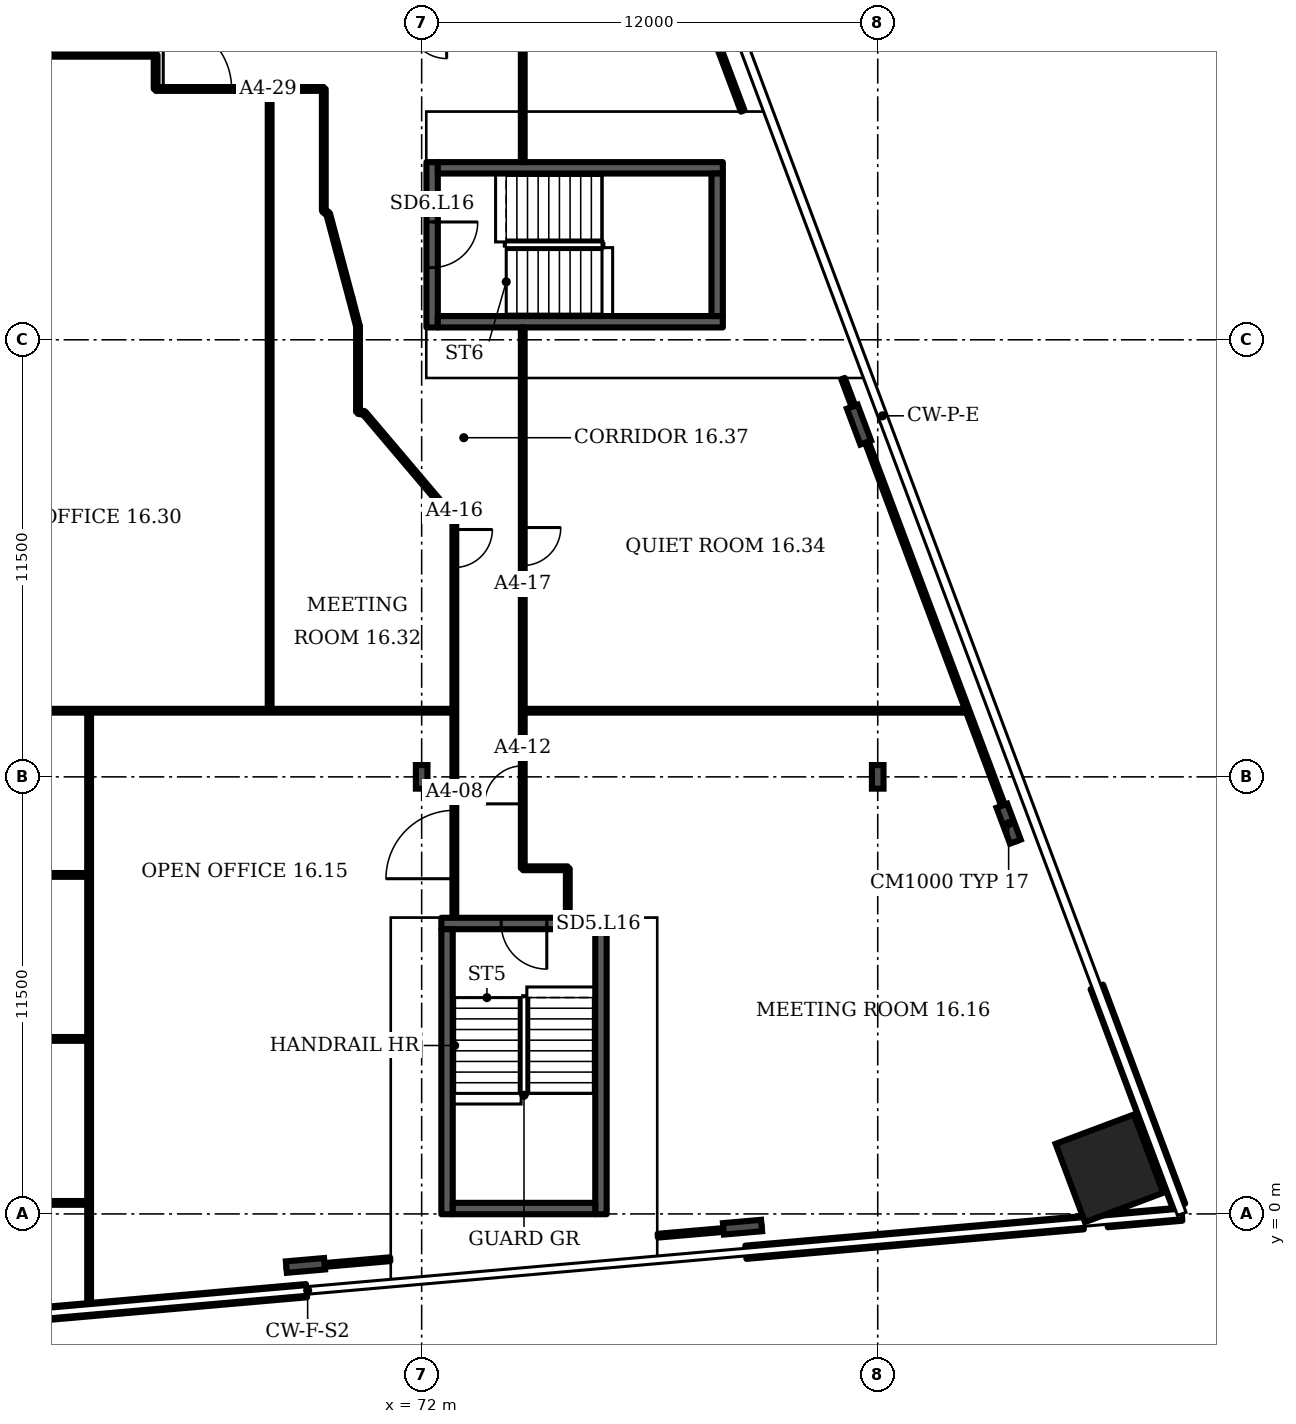
"""IFC4 building model, lengths in metres.
Left out: names, types, materials, properties, quantities, classifications, styles, units other than length and angle.
Written with IfcOpenShell. Run it as: python <this file> out.ifc"""

import sys

from ifc_helpers import new_model, si_unit, direction, frame, frame_2d, origin, origin_2d, place, context, subcontext, project, spatial, rectangle, i_section, extrude, element, fill, save


model = new_model("IFC4")
c1 = context("Model", 3, precision=1e-05, world=origin(), true_north=direction((0.0, 1.0)))
c2 = subcontext(c1, "Body", "Model", "MODEL_VIEW")
j1 = project(units=[si_unit("LENGTHUNIT", "METRE"), si_unit("PLANEANGLEUNIT", "RADIAN")], contexts=[c1])
p1 = place(None, origin())
s1 = spatial("IfcSite", under=j1, at=p1, CompositionType="ELEMENT")
p2 = place(p1, origin())
s2 = spatial("IfcBuilding", under=s1, at=p2, CompositionType="ELEMENT")
p3 = place(p2, frame((0.0, 0.0, 77.5)))
s3 = spatial("IfcBuildingStorey", under=s2, at=p3, CompositionType="ELEMENT", Elevation=77.5)
p4 = place(p3, frame((90.096, 1.2, 0.0), z_axis=(0.0, 0.0, 1.0), x_axis=(-0.351123, 0.936328, 0.0)))
e1 = element("IfcColumn", 1, at=p4, inside=s3, PredefinedType="COLUMN", context=c2, shape_type="SweptSolid", body=[
    extrude(rectangle(XDim=2.2, YDim=2.2, at=origin_2d()), origin(), (0.0, 0.0, 1.0), 3.6),
])
for number, where, z_axis, x_axis in (
    (2, (68.942, -1.355, 0.0), (0.0, 0.0, 1.0), (0.087, -0.996, 0.0)),
    (3, (80.442, -0.349, 0.0), (0.0, 0.0, 1.0), (0.087, -0.996, 0.0)),
    (4, (87.445, 10.268, 0.0), (0.0, 0.0, 1.0), (0.936, 0.351, 0.0)),
    (5, (83.507, 20.768, 0.0), (0.0, 0.0, 1.0), (0.936, 0.351, 0.0)),
):
    element("IfcColumn", number, at=place(p3, frame(where, z_axis=z_axis, x_axis=x_axis)), inside=s3, PredefinedType="COLUMN", context=c2, shape_type="SweptSolid", body=[
        extrude(i_section(OverallWidth=0.302, OverallDepth=1.008, WebThickness=0.021, FlangeThickness=0.04, FilletRadius=0.03, at=origin_2d()), origin(), (0.0, 0.0, 1.0), 3.6),
    ])
for number, where, z_axis, x_axis in (
    (6, (72.0, 11.5, 0.0), (0.0, 0.0, 1.0), (1.0, 0.0, 0.0)),
    (7, (84.0, 11.5, 0.0), (0.0, 0.0, 1.0), (1.0, 0.0, 0.0)),
):
    element("IfcColumn", number, at=place(p3, frame(where, z_axis=z_axis, x_axis=x_axis)), inside=s3, PredefinedType="COLUMN", context=c2, shape_type="SweptSolid", body=[
        extrude(i_section(OverallWidth=0.305, OverallDepth=0.62, WebThickness=0.021, FlangeThickness=0.04, FilletRadius=0.027, at=origin_2d()), origin(), (0.0, 0.0, 1.0), 3.6),
    ])
p5 = place(p3, frame((46.045, -4.026, 0.0), z_axis=(0.0, 0.0, 1.0), x_axis=(0.99619, 0.087163, 0.0)))
e8 = element("IfcWall", 8, at=p5, inside=s3, PredefinedType="SOLIDWALL", context=c2, shape_type="SweptSolid", body=[
    extrude(rectangle(XDim=23.013, YDim=0.35, at=frame_2d((11.506, 0.0))), origin(), (0.0, 0.0, 1.0), 1.0),
])
p6 = place(p3, frame((80.53, -1.009, 0.0), z_axis=(0.0, 0.0, 1.0), x_axis=(0.996198, 0.087169, 0.0)))
e9 = element("IfcWall", 9, at=p6, inside=s3, PredefinedType="SOLIDWALL", context=c2, shape_type="SweptSolid", body=[
    extrude(rectangle(XDim=8.912, YDim=0.35, at=frame_2d((4.456, 0.0))), origin(), (0.0, 0.0, 1.0), 1.0),
])
p7 = place(p3, frame((90.039, -0.177, 0.0), z_axis=(0.0, 0.0, 1.0), x_axis=(0.996193, 0.08717, 0.0)))
e10 = element("IfcWall", 10, at=p7, inside=s3, PredefinedType="SOLIDWALL", context=c2, shape_type="SweptSolid", body=[
    extrude(rectangle(XDim=1.969, YDim=0.35, at=frame_2d((0.984, 0.0))), origin(), (0.0, 0.0, 1.0), 1.0),
])
p8 = place(p3, frame((91.926, 0.211, 0.0), z_axis=(0.0, 0.0, 1.0), x_axis=(-0.351118, 0.936328, 0.0)))
e11 = element("IfcWall", 11, at=p8, inside=s3, PredefinedType="SOLIDWALL", context=c2, shape_type="SweptSolid", body=[
    extrude(rectangle(XDim=6.154, YDim=0.35, at=frame_2d((3.077, 0.0))), origin(), (0.0, 0.0, 1.0), 1.0),
])
p9 = place(p3, frame((72.518, 7.642, 0.0), z_axis=(0.0, 0.0, 1.0), x_axis=(1.0, 0.0, 0.0)))
e12 = element("IfcWall", 12, at=p9, inside=s3, PredefinedType="SHEAR", context=c2, shape_type="SweptSolid", body=[
    extrude(rectangle(XDim=4.35, YDim=0.3, at=frame_2d((2.175, 0.0))), origin(), (0.0, 0.0, 1.0), 3.2),
])
p10 = place(p9, frame((1.575, 0.0, 0.0)))
e13 = element("IfcOpeningElement", 13, at=p10, cuts=e12, PredefinedType="OPENING", context=c2, shape_type="SweptSolid", body=[
    extrude(rectangle(XDim=1.2, YDim=2.1, at=frame_2d((0.6, 1.05))), frame((0.0, 0.16, 0.0), z_axis=(0.0, -1.0, 0.0), x_axis=(1.0, 0.0, 0.0)), (0.0, 0.0, 1.0), 0.32),
])
p11 = place(p3, frame((72.275, 23.325, 0.0), z_axis=(0.0, 0.0, 1.0), x_axis=(0.0, 1.0, 0.0)))
e14 = element("IfcWall", 14, at=p11, inside=s3, PredefinedType="SHEAR", context=c2, shape_type="SweptSolid", body=[
    extrude(rectangle(XDim=4.35, YDim=0.3, at=frame_2d((2.175, 0.0))), origin(), (0.0, 0.0, 1.0), 3.2),
])
p12 = place(p11, frame((1.575, 0.0, 0.0)))
e15 = element("IfcOpeningElement", 15, at=p12, cuts=e14, PredefinedType="OPENING", context=c2, shape_type="SweptSolid", body=[
    extrude(rectangle(XDim=1.2, YDim=2.1, at=frame_2d((0.6, 1.05))), frame((0.0, 0.16, 0.0), z_axis=(0.0, -1.0, 0.0), x_axis=(1.0, 0.0, 0.0)), (0.0, 0.0, 1.0), 0.32),
])
for number, where, z_axis, x_axis in (
    (16, (45.3, 0.29, 0.0), (0.0, 0.0, 1.0), (1.0, 0.0, 0.0)),
    (17, (45.3, 4.605, 0.0), (0.0, 0.0, 1.0), (1.0, 0.0, 0.0)),
    (18, (45.3, 8.92, 0.0), (0.0, 0.0, 1.0), (1.0, 0.0, 0.0)),
):
    element("IfcWall", number, at=place(p3, frame(where, z_axis=z_axis, x_axis=x_axis)), inside=s3, PredefinedType="PARTITIONING", context=c2, shape_type="SweptSolid", body=[
        extrude(rectangle(XDim=17.95, YDim=0.1, at=frame_2d((8.975, 0.0))), origin(), (0.0, 0.0, 1.0), 3.2),
    ])
p13 = place(p3, frame((45.3, 13.24, 0.0), z_axis=(0.0, 0.0, 1.0), x_axis=(1.0, 0.0, 0.0)))
e19 = element("IfcWall", 19, at=p13, inside=s3, PredefinedType="PARTITIONING", context=c2, shape_type="SweptSolid", body=[
    extrude(rectangle(XDim=27.56, YDim=0.1, at=frame_2d((13.78, 0.0))), origin(), (0.0, 0.0, 1.0), 3.2),
])
p14 = place(p3, frame((45.3, 30.5, 0.0), z_axis=(0.0, 0.0, 1.0), x_axis=(1.0, 0.0, 0.0)))
e20 = element("IfcWall", 20, at=p14, inside=s3, PredefinedType="PARTITIONING", context=c2, shape_type="SweptSolid", body=[
    extrude(rectangle(XDim=19.7, YDim=0.1, at=frame_2d((9.85, 0.0))), origin(), (0.0, 0.0, 1.0), 3.2),
])
p15 = place(p3, frame((63.25, -2.495, 0.0), z_axis=(0.0, 0.0, 1.0), x_axis=(0.0, 1.0, 0.0)))
e21 = element("IfcWall", 21, at=p15, inside=s3, PredefinedType="PARTITIONING", context=c2, shape_type="SweptSolid", body=[
    extrude(rectangle(XDim=15.735, YDim=0.1, at=frame_2d((7.868, 0.0))), origin(), (0.0, 0.0, 1.0), 2.58),
])
p16 = place(p3, frame((65.0, 29.6, 0.0), z_axis=(0.0, 0.0, 1.0), x_axis=(0.0, 1.0, 0.0)))
e22 = element("IfcWall", 22, at=p16, inside=s3, PredefinedType="PARTITIONING", context=c2, shape_type="SweptSolid", body=[
    extrude(rectangle(XDim=0.9, YDim=0.1, at=frame_2d((0.45, 0.0))), origin(), (0.0, 0.0, 1.0), 3.2),
])
p17 = place(p3, frame((65.0, 29.6, 0.0), z_axis=(0.0, 0.0, 1.0), x_axis=(1.0, 0.0, 0.0)))
e23 = element("IfcWall", 23, at=p17, inside=s3, PredefinedType="PARTITIONING", context=c2, shape_type="SweptSolid", body=[
    extrude(rectangle(XDim=4.425, YDim=0.1, at=frame_2d((2.212, 0.0))), origin(), (0.0, 0.0, 1.0), 3.2),
])
p18 = place(p17, frame((0.2, 0.0, 0.0)))
e24 = element("IfcOpeningElement", 24, at=p18, cuts=e23, PredefinedType="OPENING", context=c2, shape_type="SweptSolid", body=[
    extrude(rectangle(XDim=1.8, YDim=2.1, at=frame_2d((0.9, 1.05))), frame((0.0, 0.06, 0.0), z_axis=(0.0, -1.0, 0.0), x_axis=(1.0, 0.0, 0.0)), (0.0, 0.0, 1.0), 0.12),
])
p19 = place(p3, frame((68.0, 13.24, 0.0), z_axis=(0.0, 0.0, 1.0), x_axis=(0.0, 1.0, 0.0)))
e25 = element("IfcWall", 25, at=p19, inside=s3, PredefinedType="PARTITIONING", context=c2, shape_type="SweptSolid", body=[
    extrude(rectangle(XDim=16.36, YDim=0.1, at=frame_2d((8.18, 0.0))), origin(), (0.0, 0.0, 1.0), 3.2),
])
p20 = place(p3, frame((68.445, -1.43, 0.0), z_axis=(0.0, 0.0, 1.0), x_axis=(0.996195, 0.087118, 0.0)))
e26 = element("IfcWall", 26, at=p20, inside=s3, PredefinedType="PARTITIONING", context=c2, shape_type="SweptSolid", body=[
    extrude(rectangle(XDim=2.738, YDim=0.1, at=frame_2d((1.369, 0.0))), origin(), (0.0, 0.0, 1.0), 2.58),
])
p21 = place(p3, frame((69.425, 26.4, 0.0), z_axis=(0.0, 0.0, 1.0), x_axis=(0.0, 1.0, 0.0)))
e27 = element("IfcWall", 27, at=p21, inside=s3, PredefinedType="PARTITIONING", context=c2, shape_type="SweptSolid", body=[
    extrude(rectangle(XDim=3.2, YDim=0.1, at=frame_2d((1.6, 0.0))), origin(), (0.0, 0.0, 1.0), 3.2),
])
p22 = place(p3, frame((69.54, 26.31, 0.0), z_axis=(0.0, 0.0, 1.0), x_axis=(-0.787997, 0.615675, 0.0)))
e28 = element("IfcWall", 28, at=p22, inside=s3, PredefinedType="PARTITIONING", context=c2, shape_type="SweptSolid", body=[
    extrude(rectangle(XDim=0.146, YDim=0.1, at=frame_2d((0.073, 0.0))), origin(), (0.0, 0.0, 1.0), 3.2),
])
p23 = place(p3, frame((70.13, 24.095, 0.0), z_axis=(0.0, 0.0, 1.0), x_axis=(-0.257318, 0.966327, 0.0)))
e29 = element("IfcWall", 29, at=p23, inside=s3, PredefinedType="PARTITIONING", context=c2, shape_type="SweptSolid", body=[
    extrude(rectangle(XDim=2.292, YDim=0.1, at=frame_2d((1.146, 0.0))), origin(), (0.0, 0.0, 1.0), 3.2),
])
p24 = place(p3, frame((70.325, 21.1, 0.0), z_axis=(0.0, 0.0, 1.0), x_axis=(0.0, 1.0, 0.0)))
e30 = element("IfcWall", 30, at=p24, inside=s3, PredefinedType="PARTITIONING", context=c2, shape_type="SweptSolid", body=[
    extrude(rectangle(XDim=2.255, YDim=0.1, at=frame_2d((1.127, 0.0))), origin(), (0.0, 0.0, 1.0), 3.2),
])
p25 = place(p3, frame((70.325, 23.355, 0.0), z_axis=(0.0, 0.0, 1.0), x_axis=(-0.254901, 0.966965, 0.0)))
e31 = element("IfcWall", 31, at=p25, inside=s3, PredefinedType="PARTITIONING", context=c2, shape_type="SweptSolid", body=[
    extrude(rectangle(XDim=0.765, YDim=0.1, at=frame_2d((0.383, 0.0))), origin(), (0.0, 0.0, 1.0), 3.2),
])
p26 = place(p3, frame((70.485, 21.075, 0.0), z_axis=(0.0, 0.0, 1.0), x_axis=(-0.987098, 0.160112, 0.0)))
e32 = element("IfcWall", 32, at=p26, inside=s3, PredefinedType="PARTITIONING", context=c2, shape_type="SweptSolid", body=[
    extrude(rectangle(XDim=0.157, YDim=0.1, at=frame_2d((0.079, 0.0))), origin(), (0.0, 0.0, 1.0), 3.2),
])
p27 = place(p3, frame((72.86, 7.812, 0.0), z_axis=(0.0, 0.0, 1.0), x_axis=(0.0, 1.0, 0.0)))
e33 = element("IfcWall", 33, at=p27, inside=s3, PredefinedType="PARTITIONING", context=c2, shape_type="SweptSolid", body=[
    extrude(rectangle(XDim=10.463, YDim=0.1, at=frame_2d((5.231, 0.0))), origin(), (0.0, 0.0, 1.0), 3.2),
])
p28 = place(p27, frame((1.008, 0.0, 0.0)))
e34 = element("IfcOpeningElement", 34, at=p28, cuts=e33, PredefinedType="OPENING", context=c2, shape_type="SweptSolid", body=[
    extrude(rectangle(XDim=1.8, YDim=2.1, at=frame_2d((0.9, 1.05))), frame((0.0, 0.06, 0.0), z_axis=(0.0, -1.0, 0.0), x_axis=(1.0, 0.0, 0.0)), (0.0, 0.0, 1.0), 0.12),
])
p29 = place(p27, frame((9.197, 0.0, 0.0)))
e35 = element("IfcOpeningElement", 35, at=p29, cuts=e33, PredefinedType="OPENING", context=c2, shape_type="SweptSolid", body=[
    extrude(rectangle(XDim=1.0, YDim=2.1, at=frame_2d((0.5, 1.05))), frame((0.0, 0.06, 0.0), z_axis=(0.0, -1.0, 0.0), x_axis=(1.0, 0.0, 0.0)), (0.0, 0.0, 1.0), 0.12),
])
p30 = place(p3, frame((72.86, 18.275, 0.0), z_axis=(0.0, 0.0, 1.0), x_axis=(-0.646848, 0.762613, 0.0)))
e36 = element("IfcWall", 36, at=p30, inside=s3, PredefinedType="PARTITIONING", context=c2, shape_type="SweptSolid", body=[
    extrude(rectangle(XDim=3.672, YDim=0.1, at=frame_2d((1.836, 0.0))), origin(), (0.0, 0.0, 1.0), 3.2),
])
p31 = place(p3, frame((74.66, 9.095, 0.0), z_axis=(0.0, 0.0, 1.0), x_axis=(0.0, 1.0, 0.0)))
e37 = element("IfcWall", 37, at=p31, inside=s3, PredefinedType="PARTITIONING", context=c2, shape_type="SweptSolid", body=[
    extrude(rectangle(XDim=14.23, YDim=0.1, at=frame_2d((7.115, 0.0))), origin(), (0.0, 0.0, 1.0), 3.2),
])
p32 = place(p31, frame((1.695, 0.0, 0.0)))
e38 = element("IfcOpeningElement", 38, at=p32, cuts=e37, PredefinedType="OPENING", context=c2, shape_type="SweptSolid", body=[
    extrude(rectangle(XDim=1.0, YDim=2.1, at=frame_2d((0.5, 1.05))), frame((0.0, 0.06, 0.0), z_axis=(0.0, -1.0, 0.0), x_axis=(1.0, 0.0, 0.0)), (0.0, 0.0, 1.0), 0.12),
])
p33 = place(p31, frame((7.965, 0.0, 0.0)))
e39 = element("IfcOpeningElement", 39, at=p33, cuts=e37, PredefinedType="OPENING", context=c2, shape_type="SweptSolid", body=[
    extrude(rectangle(XDim=1.0, YDim=2.1, at=frame_2d((0.5, 1.05))), frame((0.0, 0.06, 0.0), z_axis=(0.0, -1.0, 0.0), x_axis=(1.0, 0.0, 0.0)), (0.0, 0.0, 1.0), 0.12),
])
p34 = place(p3, frame((74.66, 27.675, 0.0), z_axis=(0.0, 0.0, 1.0), x_axis=(0.0, 1.0, 0.0)))
e40 = element("IfcWall", 40, at=p34, inside=s3, PredefinedType="PARTITIONING", context=c2, shape_type="SweptSolid", body=[
    extrude(rectangle(XDim=3.325, YDim=0.1, at=frame_2d((1.663, 0.0))), origin(), (0.0, 0.0, 1.0), 3.2),
])
p35 = place(p3, frame((74.665, 9.095, 0.0), z_axis=(0.0, 0.0, 1.0), x_axis=(1.0, 0.0, 0.0)))
e41 = element("IfcWall", 41, at=p35, inside=s3, PredefinedType="PARTITIONING", context=c2, shape_type="SweptSolid", body=[
    extrude(rectangle(XDim=1.175, YDim=0.1, at=frame_2d((0.587, 0.0))), origin(), (0.0, 0.0, 1.0), 3.2),
])
p36 = place(p3, frame((74.665, 13.24, 0.0), z_axis=(0.0, 0.0, 1.0), x_axis=(1.0, 0.0, 0.0)))
e42 = element("IfcWall", 42, at=p36, inside=s3, PredefinedType="PARTITIONING", context=c2, shape_type="SweptSolid", body=[
    extrude(rectangle(XDim=11.7, YDim=0.1, at=frame_2d((5.85, 0.0))), origin(), (0.0, 0.0, 1.0), 3.2),
])
p37 = place(p3, frame((75.845, 7.812, 0.0), z_axis=(0.0, 0.0, 1.0), x_axis=(0.0, 1.0, 0.0)))
e43 = element("IfcWall", 43, at=p37, inside=s3, PredefinedType="PARTITIONING", context=c2, shape_type="SweptSolid", body=[
    extrude(rectangle(XDim=1.278, YDim=0.1, at=frame_2d((0.639, 0.0))), origin(), (0.0, 0.0, 1.0), 3.2),
])
p38 = place(p3, frame((78.212, -0.573, 0.0), z_axis=(0.0, 0.0, 1.0), x_axis=(0.996224, 0.086779, 0.0)))
e44 = element("IfcWall", 44, at=p38, inside=s3, PredefinedType="PARTITIONING", context=c2, shape_type="SweptSolid", body=[
    extrude(rectangle(XDim=2.743, YDim=0.1, at=frame_2d((1.372, 0.0))), origin(), (0.0, 0.0, 1.0), 2.58),
])
p39 = place(p3, frame((80.448, 29.02, 0.0), z_axis=(0.0, 0.0, 1.0), x_axis=(-0.35129, 0.93627, 0.0)))
e45 = element("IfcWall", 45, at=p39, inside=s3, PredefinedType="PARTITIONING", context=c2, shape_type="SweptSolid", body=[
    extrude(rectangle(XDim=2.911, YDim=0.1, at=frame_2d((1.455, 0.0))), origin(), (0.0, 0.0, 1.0), 2.58),
])
p40 = place(p3, frame((87.65, 9.81, 0.0), z_axis=(0.0, 0.0, 1.0), x_axis=(-0.35104, 0.936357, 0.0)))
e46 = element("IfcWall", 46, at=p40, inside=s3, PredefinedType="PARTITIONING", context=c2, shape_type="SweptSolid", body=[
    extrude(rectangle(XDim=12.997, YDim=0.1, at=frame_2d((6.499, 0.0))), origin(), (0.0, 0.0, 1.0), 2.58),
])
for number, where, z_axis, x_axis in (
    (47, (72.667, -0.008, 0.0), (0.0, 0.0, 1.0), (0.0, 1.0, 0.0)),
    (48, (76.718, -0.008, 0.0), (0.0, 0.0, 1.0), (0.0, 1.0, 0.0)),
):
    element("IfcWall", number, at=place(p3, frame(where, z_axis=z_axis, x_axis=x_axis)), inside=s3, PredefinedType="SHEAR", context=c2, shape_type="SweptSolid", body=[
        extrude(rectangle(XDim=7.5, YDim=0.3, at=frame_2d((3.75, 0.0))), origin(), (0.0, 0.0, 1.0), 3.2),
    ])
p41 = place(p3, frame((72.817, 0.142, 0.0), z_axis=(0.0, 0.0, 1.0), x_axis=(1.0, 0.0, 0.0)))
e49 = element("IfcWall", 49, at=p41, inside=s3, PredefinedType="SHEAR", context=c2, shape_type="SweptSolid", body=[
    extrude(rectangle(XDim=3.75, YDim=0.3, at=frame_2d((1.875, 0.0))), origin(), (0.0, 0.0, 1.0), 3.2),
])
for number, where, z_axis, x_axis in (
    (50, (72.425, 23.475, 0.0), (0.0, 0.0, 1.0), (1.0, 0.0, 0.0)),
    (51, (72.425, 27.525, 0.0), (0.0, 0.0, 1.0), (1.0, 0.0, 0.0)),
):
    element("IfcWall", number, at=place(p3, frame(where, z_axis=z_axis, x_axis=x_axis)), inside=s3, PredefinedType="SHEAR", context=c2, shape_type="SweptSolid", body=[
        extrude(rectangle(XDim=7.5, YDim=0.3, at=frame_2d((3.75, 0.0))), origin(), (0.0, 0.0, 1.0), 3.2),
    ])
p42 = place(p3, frame((79.775, 23.625, 0.0), z_axis=(0.0, 0.0, 1.0), x_axis=(0.0, 1.0, 0.0)))
e52 = element("IfcWall", 52, at=p42, inside=s3, PredefinedType="SHEAR", context=c2, shape_type="SweptSolid", body=[
    extrude(rectangle(XDim=3.75, YDim=0.3, at=frame_2d((1.875, 0.0))), origin(), (0.0, 0.0, 1.0), 3.2),
])
p43 = place(p10, origin())
e53 = element("IfcDoor", 53, at=p43, inside=s3, OperationType="SINGLE_SWING_RIGHT", PredefinedType="DOOR", context=c2, shape_type="SweptSolid", body=[
    extrude(rectangle(XDim=1.2, YDim=2.1, at=frame_2d((0.6, 1.05))), frame((0.0, 0.025, 0.0), z_axis=(0.0, -1.0, 0.0), x_axis=(1.0, 0.0, 0.0)), (0.0, 0.0, 1.0), 0.05),
])
fill(e13, e53)
p44 = place(p12, origin())
e54 = element("IfcDoor", 54, at=p44, inside=s3, OperationType="SINGLE_SWING_RIGHT", PredefinedType="DOOR", context=c2, shape_type="SweptSolid", body=[
    extrude(rectangle(XDim=1.2, YDim=2.1, at=frame_2d((0.6, 1.05))), frame((0.0, 0.025, 0.0), z_axis=(0.0, -1.0, 0.0), x_axis=(1.0, 0.0, 0.0)), (0.0, 0.0, 1.0), 0.05),
])
fill(e15, e54)
p45 = place(p28, origin())
e55 = element("IfcDoor", 55, at=p45, inside=s3, OperationType="DOUBLE_DOOR_SINGLE_SWING", PredefinedType="DOOR", context=c2, shape_type="SweptSolid", body=[
    extrude(rectangle(XDim=1.8, YDim=2.1, at=frame_2d((0.9, 1.05))), frame((0.0, 0.025, 0.0), z_axis=(0.0, -1.0, 0.0), x_axis=(1.0, 0.0, 0.0)), (0.0, 0.0, 1.0), 0.05),
])
fill(e34, e55)
p46 = place(p32, origin())
e56 = element("IfcDoor", 56, at=p46, inside=s3, OperationType="SINGLE_SWING_LEFT", PredefinedType="DOOR", context=c2, shape_type="SweptSolid", body=[
    extrude(rectangle(XDim=1.0, YDim=2.1, at=frame_2d((0.5, 1.05))), frame((0.0, 0.025, 0.0), z_axis=(0.0, -1.0, 0.0), x_axis=(1.0, 0.0, 0.0)), (0.0, 0.0, 1.0), 0.05),
])
fill(e38, e56)
p47 = place(p29, origin())
e57 = element("IfcDoor", 57, at=p47, inside=s3, OperationType="SINGLE_SWING_RIGHT", PredefinedType="DOOR", context=c2, shape_type="SweptSolid", body=[
    extrude(rectangle(XDim=1.0, YDim=2.1, at=frame_2d((0.5, 1.05))), frame((0.0, 0.025, 0.0), z_axis=(0.0, -1.0, 0.0), x_axis=(1.0, 0.0, 0.0)), (0.0, 0.0, 1.0), 0.05),
])
fill(e35, e57)
p48 = place(p33, origin())
e58 = element("IfcDoor", 58, at=p48, inside=s3, OperationType="SINGLE_SWING_RIGHT", PredefinedType="DOOR", context=c2, shape_type="SweptSolid", body=[
    extrude(rectangle(XDim=1.0, YDim=2.1, at=frame_2d((0.5, 1.05))), frame((0.0, 0.025, 0.0), z_axis=(0.0, -1.0, 0.0), x_axis=(1.0, 0.0, 0.0)), (0.0, 0.0, 1.0), 0.05),
])
fill(e39, e58)
p49 = place(p18, origin())
e59 = element("IfcDoor", 59, at=p49, inside=s3, OperationType="DOUBLE_DOOR_SINGLE_SWING", PredefinedType="DOOR", context=c2, shape_type="SweptSolid", body=[
    extrude(rectangle(XDim=1.8, YDim=2.1, at=frame_2d((0.9, 1.05))), frame((0.0, 0.025, 0.0), z_axis=(0.0, -1.0, 0.0), x_axis=(1.0, 0.0, 0.0)), (0.0, 0.0, 1.0), 0.05),
])
fill(e24, e59)
save(model, sys.argv[1])
